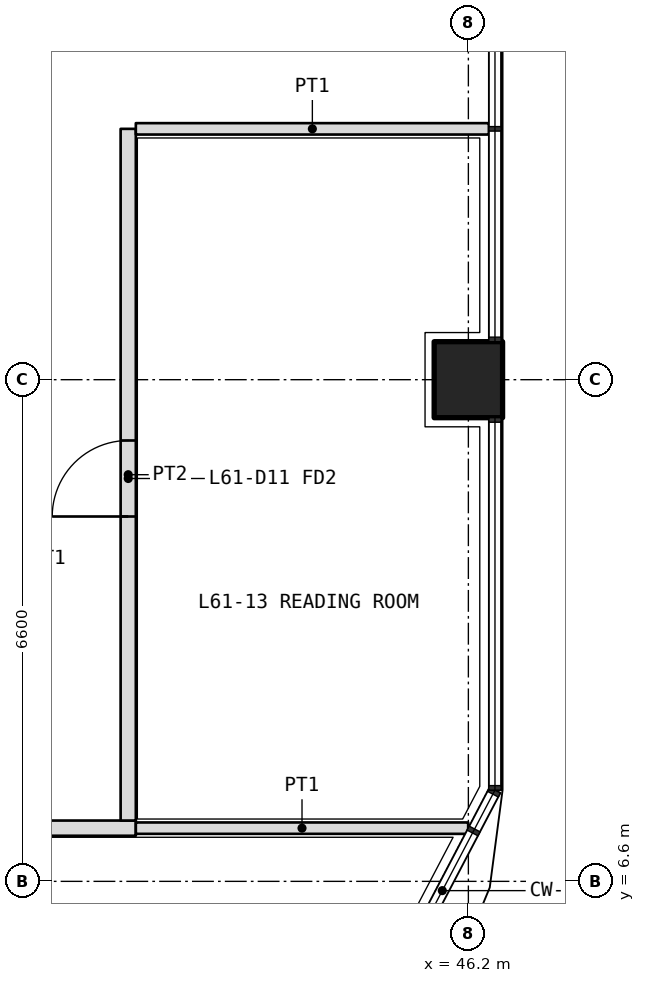
"""IFC4 building model, lengths in metres.
Left out: names, types, materials, properties, quantities, classifications, styles, units other than length and angle.
Written with IfcOpenShell. Run it as: python <this file> out.ifc"""

import sys

from ifc_helpers import new_model, si_unit, direction, frame, frame_2d, origin, origin_2d, place, context, subcontext, project, spatial, rectangle, extrude, element, fill, save


model = new_model("IFC4")
c1 = context("Model", 3, precision=1e-05, world=origin(), true_north=direction((0.0, 1.0)))
c2 = subcontext(c1, "Body", "Model", "MODEL_VIEW")
j1 = project(units=[si_unit("LENGTHUNIT", "METRE"), si_unit("PLANEANGLEUNIT", "RADIAN")], contexts=[c1])
p1 = place(None, origin())
s1 = spatial("IfcSite", under=j1, at=p1, CompositionType="ELEMENT")
p2 = place(p1, origin())
s2 = spatial("IfcBuilding", under=s1, at=p2, CompositionType="ELEMENT")
p3 = place(p2, frame((0.0, 0.0, 267.0)))
s3 = spatial("IfcBuildingStorey", under=s2, at=p3, CompositionType="ELEMENT", Elevation=267.0)
p4 = place(p3, frame((46.2, 13.2, 0.0), z_axis=(0.0, 0.0, 1.0), x_axis=(0.0, 1.0, 0.0)))
e1 = element("IfcColumn", 1, at=p4, inside=s3, PredefinedType="COLUMN", context=c2, shape_type="SweptSolid", body=[
    extrude(rectangle(XDim=1.0, YDim=0.9, at=origin_2d()), origin(), (0.0, 0.0, 1.0), 4.2),
])
p5 = place(p3, frame((10.975, 7.3, 0.0), z_axis=(0.0, 0.0, 1.0), x_axis=(1.0, 0.0, 0.0)))
e2 = element("IfcWall", 2, at=p5, inside=s3, PredefinedType="PARTITIONING", context=c2, shape_type="SweptSolid", body=[
    extrude(rectangle(XDim=30.85, YDim=0.2, at=frame_2d((15.425, 0.0))), origin(), (0.0, 0.0, 1.0), 3.0),
])
p6 = place(p5, frame((7.262, 0.0, 0.0)))
e3 = element("IfcOpeningElement", 3, at=p6, cuts=e2, PredefinedType="OPENING", context=c2, shape_type="SweptSolid", body=[
    extrude(rectangle(XDim=1.0, YDim=2.1, at=frame_2d((0.5, 1.05))), frame((0.0, 0.11, 0.0), z_axis=(0.0, -1.0, 0.0), x_axis=(1.0, 0.0, 0.0)), (0.0, 0.0, 1.0), 0.22),
])
p7 = place(p5, frame((16.625, 0.0, 0.0)))
e4 = element("IfcOpeningElement", 4, at=p7, cuts=e2, PredefinedType="OPENING", context=c2, shape_type="SweptSolid", body=[
    extrude(rectangle(XDim=1.0, YDim=2.1, at=frame_2d((0.5, 1.05))), frame((0.0, 0.11, 0.0), z_axis=(0.0, -1.0, 0.0), x_axis=(1.0, 0.0, 0.0)), (0.0, 0.0, 1.0), 0.22),
])
p8 = place(p5, frame((19.925, 0.0, 0.0)))
e5 = element("IfcOpeningElement", 5, at=p8, cuts=e2, PredefinedType="OPENING", context=c2, shape_type="SweptSolid", body=[
    extrude(rectangle(XDim=1.0, YDim=2.1, at=frame_2d((0.5, 1.05))), frame((0.0, 0.11, 0.0), z_axis=(0.0, -1.0, 0.0), x_axis=(1.0, 0.0, 0.0)), (0.0, 0.0, 1.0), 0.22),
])
p9 = place(p5, frame((25.887, 0.0, 0.0)))
e6 = element("IfcOpeningElement", 6, at=p9, cuts=e2, PredefinedType="OPENING", context=c2, shape_type="SweptSolid", body=[
    extrude(rectangle(XDim=1.0, YDim=2.1, at=frame_2d((0.5, 1.05))), frame((0.0, 0.11, 0.0), z_axis=(0.0, -1.0, 0.0), x_axis=(1.0, 0.0, 0.0)), (0.0, 0.0, 1.0), 0.22),
])
p10 = place(p3, frame((41.725, 7.4, 0.0), z_axis=(0.0, 0.0, 1.0), x_axis=(0.0, 1.0, 0.0)))
e7 = element("IfcWall", 7, at=p10, inside=s3, PredefinedType="PARTITIONING", context=c2, shape_type="SweptSolid", body=[
    extrude(rectangle(XDim=9.1, YDim=0.2, at=frame_2d((4.55, 0.0))), origin(), (0.0, 0.0, 1.0), 3.0),
])
p11 = place(p10, frame((4.0, 0.0, 0.0)))
e8 = element("IfcOpeningElement", 8, at=p11, cuts=e7, PredefinedType="OPENING", context=c2, shape_type="SweptSolid", body=[
    extrude(rectangle(XDim=1.0, YDim=2.1, at=frame_2d((0.5, 1.05))), frame((0.0, 0.11, 0.0), z_axis=(0.0, -1.0, 0.0), x_axis=(1.0, 0.0, 0.0)), (0.0, 0.0, 1.0), 0.22),
])
p12 = place(p3, frame((46.198, 7.3, 0.0), z_axis=(0.0, 0.0, 1.0), x_axis=(-1.0, 0.0, 0.0)))
e9 = element("IfcWall", 9, at=p12, inside=s3, PredefinedType="PARTITIONING", context=c2, shape_type="SweptSolid", body=[
    extrude(rectangle(XDim=4.373, YDim=0.15, at=frame_2d((2.186, 0.0))), origin(), (0.0, 0.0, 1.0), 2.7),
])
p13 = place(p3, frame((46.47, 16.5, 0.0), z_axis=(0.0, 0.0, 1.0), x_axis=(-1.0, 0.0, 0.0)))
e10 = element("IfcWall", 10, at=p13, inside=s3, PredefinedType="PARTITIONING", context=c2, shape_type="SweptSolid", body=[
    extrude(rectangle(XDim=4.645, YDim=0.15, at=frame_2d((2.323, 0.0))), origin(), (0.0, 0.0, 1.0), 2.7),
])
p14 = place(p11, origin())
e11 = element("IfcDoor", 11, at=p14, inside=s3, OperationType="SINGLE_SWING_LEFT", PredefinedType="DOOR", context=c2, shape_type="SweptSolid", body=[
    extrude(rectangle(XDim=1.0, YDim=2.1, at=frame_2d((0.5, 1.05))), frame((0.0, 0.025, 0.0), z_axis=(0.0, -1.0, 0.0), x_axis=(1.0, 0.0, 0.0)), (0.0, 0.0, 1.0), 0.05),
])
fill(e8, e11)
save(model, sys.argv[1])
